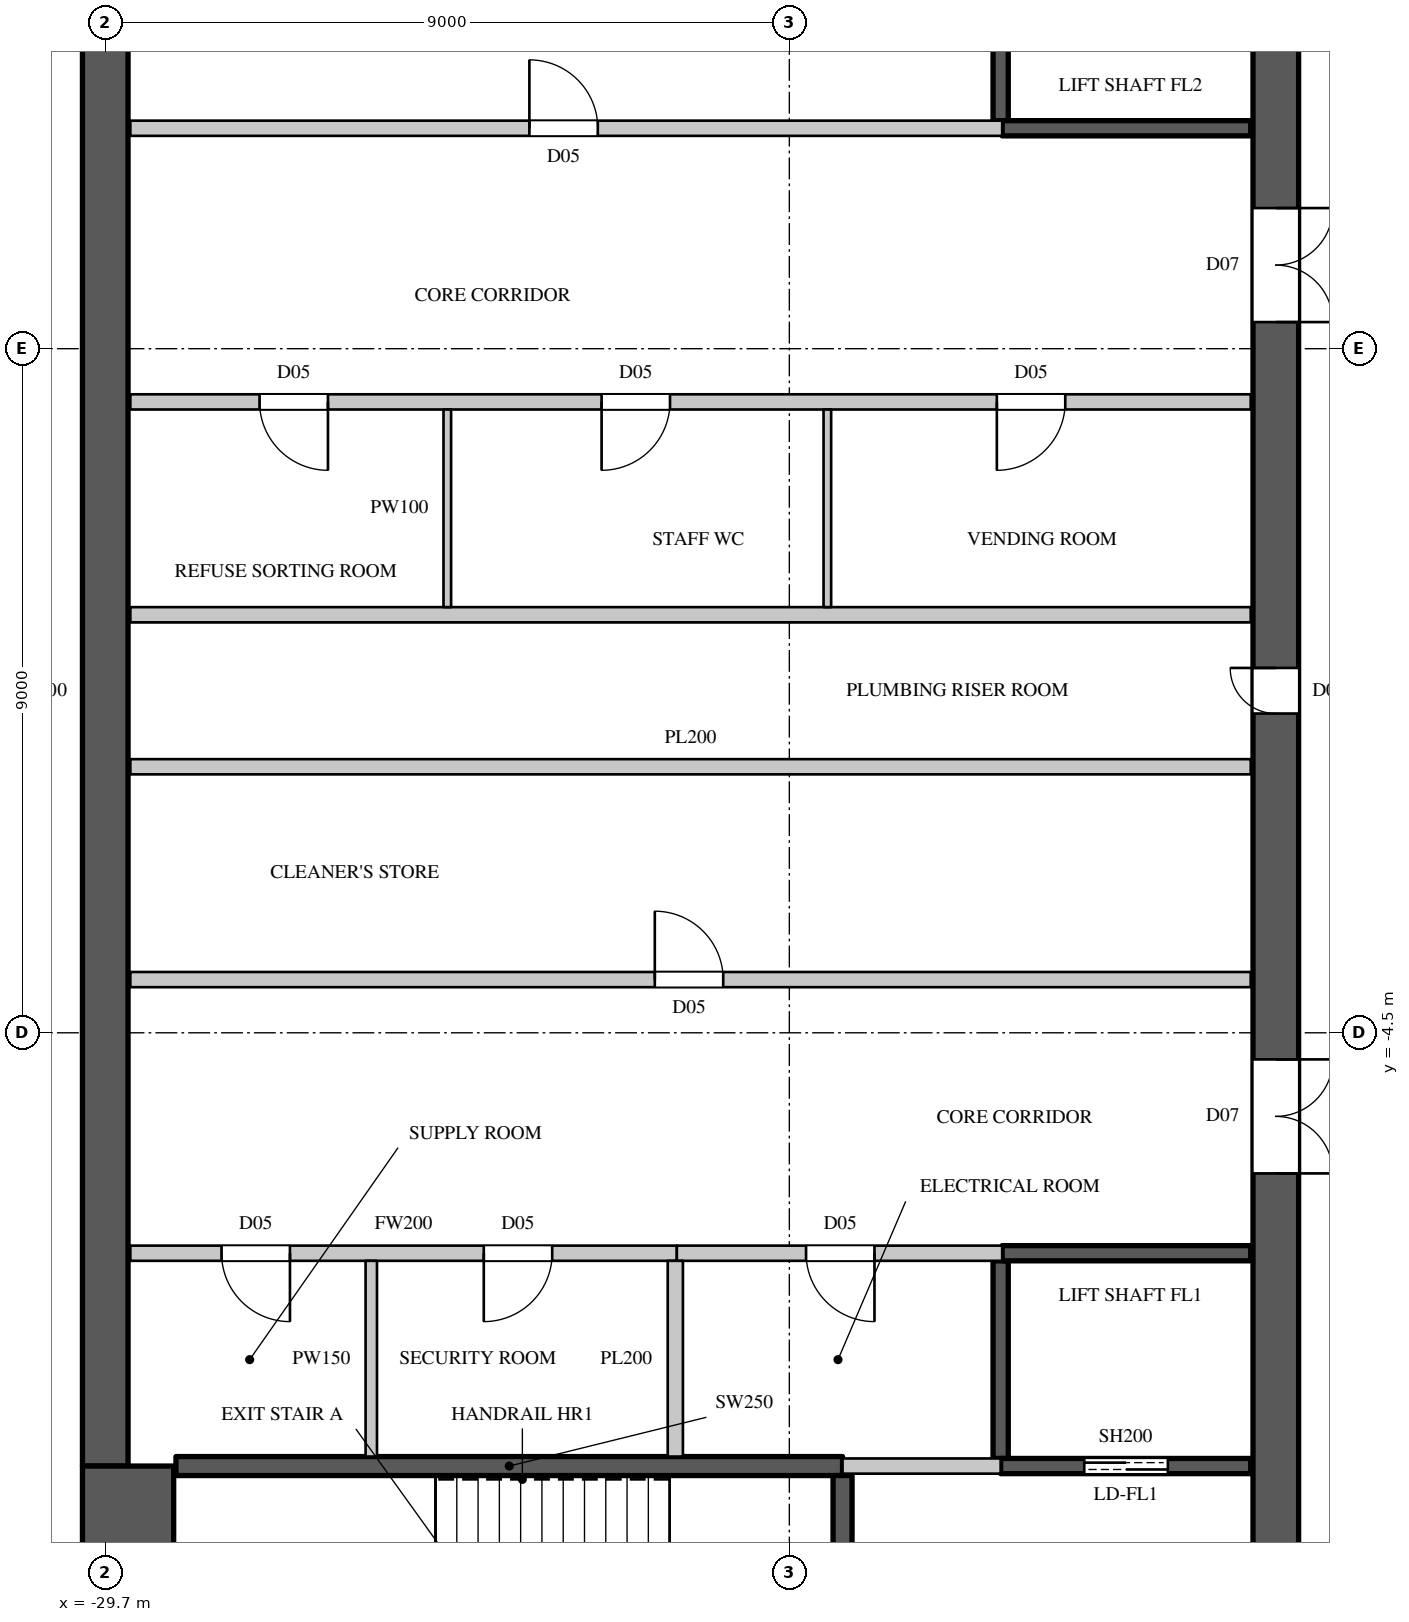
"""IFC4 building model, lengths in metres.
Left out: names, types, materials, properties, quantities, classifications, styles, units other than length and angle.
Written with IfcOpenShell. Run it as: python <this file> out.ifc"""

import sys

from ifc_helpers import new_model, si_unit, direction, frame, frame_2d, origin, place, context, subcontext, project, spatial, rectangle, extrude, element, fill, save


model = new_model("IFC4")
c1 = context("Model", 3, precision=1e-05, world=origin(), true_north=direction((0.0, 1.0)))
c2 = subcontext(c1, "Body", "Model", "MODEL_VIEW")
j1 = project(units=[si_unit("LENGTHUNIT", "METRE"), si_unit("PLANEANGLEUNIT", "RADIAN")], contexts=[c1])
p1 = place(None, origin())
s1 = spatial("IfcSite", under=j1, at=p1, CompositionType="ELEMENT")
p2 = place(p1, origin())
s2 = spatial("IfcBuilding", under=s1, at=p2, CompositionType="ELEMENT")
p3 = place(p2, frame((0.0, 0.0, 339.0)))
s3 = spatial("IfcBuildingStorey", under=s2, at=p3, CompositionType="ELEMENT", Elevation=339.0)
p4 = place(p3, frame((-14.3, -14.8, 0.0), z_axis=(0.0, 0.0, 1.0), x_axis=(0.0, 1.0, 0.0)))
e1 = element("IfcWall", 1, at=p4, inside=s3, PredefinedType="SHEAR", context=c2, shape_type="SweptSolid", body=[
    extrude(rectangle(XDim=29.6, YDim=0.6, at=frame_2d((14.8, 0.0))), origin(), (0.0, 0.0, 1.0), 4.0),
])
p5 = place(p4, frame((1.55, 0.0, 0.0)))
e2 = element("IfcOpeningElement", 2, at=p5, cuts=e1, PredefinedType="OPENING", context=c2, shape_type="SweptSolid", body=[
    extrude(rectangle(XDim=1.5, YDim=2.4, at=frame_2d((0.75, 1.2))), frame((0.0, 0.31, 0.0), z_axis=(0.0, -1.0, 0.0), x_axis=(1.0, 0.0, 0.0)), (0.0, 0.0, 1.0), 0.62),
])
p6 = place(p4, frame((26.55, 0.0, 0.0)))
e3 = element("IfcOpeningElement", 3, at=p6, cuts=e1, PredefinedType="OPENING", context=c2, shape_type="SweptSolid", body=[
    extrude(rectangle(XDim=1.5, YDim=2.4, at=frame_2d((0.75, 1.2))), frame((0.0, 0.31, 0.0), z_axis=(0.0, -1.0, 0.0), x_axis=(1.0, 0.0, 0.0)), (0.0, 0.0, 1.0), 0.62),
])
p7 = place(p4, frame((8.45, 0.0, 0.0)))
e4 = element("IfcOpeningElement", 4, at=p7, cuts=e1, PredefinedType="OPENING", context=c2, shape_type="SweptSolid", body=[
    extrude(rectangle(XDim=1.5, YDim=2.4, at=frame_2d((0.75, 1.2))), frame((0.0, 0.31, 0.0), z_axis=(0.0, -1.0, 0.0), x_axis=(1.0, 0.0, 0.0)), (0.0, 0.0, 1.0), 0.62),
])
p8 = place(p4, frame((19.65, 0.0, 0.0)))
e5 = element("IfcOpeningElement", 5, at=p8, cuts=e1, PredefinedType="OPENING", context=c2, shape_type="SweptSolid", body=[
    extrude(rectangle(XDim=1.5, YDim=2.4, at=frame_2d((0.75, 1.2))), frame((0.0, 0.31, 0.0), z_axis=(0.0, -1.0, 0.0), x_axis=(1.0, 0.0, 0.0)), (0.0, 0.0, 1.0), 0.62),
])
p9 = place(p4, frame((14.5, 0.0, 0.0)))
e6 = element("IfcOpeningElement", 6, at=p9, cuts=e1, PredefinedType="OPENING", context=c2, shape_type="SweptSolid", body=[
    extrude(rectangle(XDim=0.6, YDim=2.0, at=frame_2d((0.3, 1.0))), frame((0.0, 0.31, 0.0), z_axis=(0.0, -1.0, 0.0), x_axis=(1.0, 0.0, 0.0)), (0.0, 0.0, 1.0), 0.62),
])
p10 = place(p3, frame((-29.7, -10.2, 0.0), z_axis=(0.0, 0.0, 1.0), x_axis=(0.0, 1.0, 0.0)))
e7 = element("IfcWall", 7, at=p10, inside=s3, PredefinedType="SHEAR", context=c2, shape_type="SweptSolid", body=[
    extrude(rectangle(XDim=20.4, YDim=0.6, at=frame_2d((10.2, 0.0))), origin(), (0.0, 0.0, 1.0), 4.0),
])
p11 = place(p3, frame((-29.4, -14.8, 0.0), z_axis=(0.0, 0.0, 1.0), x_axis=(0.0, 1.0, 0.0)))
e8 = element("IfcWall", 8, at=p11, inside=s3, PredefinedType="SHEAR", context=c2, shape_type="SweptSolid", body=[
    extrude(rectangle(XDim=4.6, YDim=1.2, at=frame_2d((2.3, 0.0))), origin(), (0.0, 0.0, 1.0), 4.0),
])
p12 = place(p3, frame((-29.37, -7.4, 0.0), z_axis=(0.0, 0.0, 1.0), x_axis=(1.0, 0.0, 0.0)))
e9 = element("IfcWall", 9, at=p12, inside=s3, PredefinedType="PARTITIONING", context=c2, shape_type="SweptSolid", body=[
    extrude(rectangle(XDim=7.19, YDim=0.2, at=frame_2d((3.595, 0.0))), origin(), (0.0, 0.0, 1.0), 3.598),
])
p13 = place(p12, frame((1.2, 0.0, 0.0)))
e10 = element("IfcOpeningElement", 10, at=p13, cuts=e9, PredefinedType="OPENING", context=c2, shape_type="SweptSolid", body=[
    extrude(rectangle(XDim=0.9, YDim=2.2, at=frame_2d((0.45, 1.1))), frame((0.0, 0.11, 0.0), z_axis=(0.0, -1.0, 0.0), x_axis=(1.0, 0.0, 0.0)), (0.0, 0.0, 1.0), 0.22),
])
p14 = place(p12, frame((4.65, 0.0, 0.0)))
e11 = element("IfcOpeningElement", 11, at=p14, cuts=e9, PredefinedType="OPENING", context=c2, shape_type="SweptSolid", body=[
    extrude(rectangle(XDim=0.9, YDim=2.2, at=frame_2d((0.45, 1.1))), frame((0.0, 0.11, 0.0), z_axis=(0.0, -1.0, 0.0), x_axis=(1.0, 0.0, 0.0)), (0.0, 0.0, 1.0), 0.22),
])
p15 = place(p3, frame((-29.37, -3.8, 0.0), z_axis=(0.0, 0.0, 1.0), x_axis=(1.0, 0.0, 0.0)))
e12 = element("IfcWall", 12, at=p15, inside=s3, PredefinedType="PARTITIONING", context=c2, shape_type="SweptSolid", body=[
    extrude(rectangle(XDim=14.74, YDim=0.2, at=frame_2d((7.37, 0.0))), origin(), (0.0, 0.0, 1.0), 3.598),
])
p16 = place(p15, frame((6.9, 0.0, 0.0)))
e13 = element("IfcOpeningElement", 13, at=p16, cuts=e12, PredefinedType="OPENING", context=c2, shape_type="SweptSolid", body=[
    extrude(rectangle(XDim=0.9, YDim=2.2, at=frame_2d((0.45, 1.1))), frame((0.0, 0.11, 0.0), z_axis=(0.0, -1.0, 0.0), x_axis=(1.0, 0.0, 0.0)), (0.0, 0.0, 1.0), 0.22),
])
p17 = place(p3, frame((-29.37, 3.8, 0.0), z_axis=(0.0, 0.0, 1.0), x_axis=(1.0, 0.0, 0.0)))
e14 = element("IfcWall", 14, at=p17, inside=s3, PredefinedType="PARTITIONING", context=c2, shape_type="SweptSolid", body=[
    extrude(rectangle(XDim=14.74, YDim=0.2, at=frame_2d((7.37, 0.0))), origin(), (0.0, 0.0, 1.0), 3.598),
])
p18 = place(p17, frame((1.7, 0.0, 0.0)))
e15 = element("IfcOpeningElement", 15, at=p18, cuts=e14, PredefinedType="OPENING", context=c2, shape_type="SweptSolid", body=[
    extrude(rectangle(XDim=0.9, YDim=2.2, at=frame_2d((0.45, 1.1))), frame((0.0, 0.11, 0.0), z_axis=(0.0, -1.0, 0.0), x_axis=(1.0, 0.0, 0.0)), (0.0, 0.0, 1.0), 0.22),
])
p19 = place(p17, frame((6.2, 0.0, 0.0)))
e16 = element("IfcOpeningElement", 16, at=p19, cuts=e14, PredefinedType="OPENING", context=c2, shape_type="SweptSolid", body=[
    extrude(rectangle(XDim=0.9, YDim=2.2, at=frame_2d((0.45, 1.1))), frame((0.0, 0.11, 0.0), z_axis=(0.0, -1.0, 0.0), x_axis=(1.0, 0.0, 0.0)), (0.0, 0.0, 1.0), 0.22),
])
p20 = place(p17, frame((11.4, 0.0, 0.0)))
e17 = element("IfcOpeningElement", 17, at=p20, cuts=e14, PredefinedType="OPENING", context=c2, shape_type="SweptSolid", body=[
    extrude(rectangle(XDim=0.9, YDim=2.2, at=frame_2d((0.45, 1.1))), frame((0.0, 0.11, 0.0), z_axis=(0.0, -1.0, 0.0), x_axis=(1.0, 0.0, 0.0)), (0.0, 0.0, 1.0), 0.22),
])
p21 = place(p3, frame((-29.37, 7.4, 0.0), z_axis=(0.0, 0.0, 1.0), x_axis=(1.0, 0.0, 0.0)))
e18 = element("IfcWall", 18, at=p21, inside=s3, PredefinedType="PARTITIONING", context=c2, shape_type="SweptSolid", body=[
    extrude(rectangle(XDim=11.47, YDim=0.2, at=frame_2d((5.735, 0.0))), origin(), (0.0, 0.0, 1.0), 3.598),
])
p22 = place(p21, frame((5.25, 0.0, 0.0)))
e19 = element("IfcOpeningElement", 19, at=p22, cuts=e18, PredefinedType="OPENING", context=c2, shape_type="SweptSolid", body=[
    extrude(rectangle(XDim=0.9, YDim=2.2, at=frame_2d((0.45, 1.1))), frame((0.0, 0.11, 0.0), z_axis=(0.0, -1.0, 0.0), x_axis=(1.0, 0.0, 0.0)), (0.0, 0.0, 1.0), 0.22),
])
p23 = place(p3, frame((-26.2, -10.075, 0.0), z_axis=(0.0, 0.0, 1.0), x_axis=(0.0, 1.0, 0.0)))
e20 = element("IfcWall", 20, at=p23, inside=s3, PredefinedType="PARTITIONING", context=c2, shape_type="SweptSolid", body=[
    extrude(rectangle(XDim=2.575, YDim=0.15, at=frame_2d((1.288, 0.0))), origin(), (0.0, 0.0, 1.0), 3.598),
])
for number, where, z_axis, x_axis in (
    (21, (-29.37, -1.0, 0.0), (0.0, 0.0, 1.0), (1.0, 0.0, 0.0)),
    (22, (-29.37, 1.0, 0.0), (0.0, 0.0, 1.0), (1.0, 0.0, 0.0)),
):
    element("IfcWall", number, at=place(p3, frame(where, z_axis=z_axis, x_axis=x_axis)), inside=s3, PredefinedType="PARTITIONING", context=c2, shape_type="SweptSolid", body=[
        extrude(rectangle(XDim=14.74, YDim=0.2, at=frame_2d((7.37, 0.0))), origin(), (0.0, 0.0, 1.0), 3.598),
    ])
p24 = place(p3, frame((-22.18, -7.4, 0.0), z_axis=(0.0, 0.0, 1.0), x_axis=(1.0, 0.0, 0.0)))
e23 = element("IfcWall", 23, at=p24, inside=s3, PredefinedType="PARTITIONING", context=c2, shape_type="SweptSolid", body=[
    extrude(rectangle(XDim=4.28, YDim=0.2, at=frame_2d((2.14, 0.0))), origin(), (0.0, 0.0, 1.0), 3.598),
])
p25 = place(p24, frame((1.7, 0.0, 0.0)))
e24 = element("IfcOpeningElement", 24, at=p25, cuts=e23, PredefinedType="OPENING", context=c2, shape_type="SweptSolid", body=[
    extrude(rectangle(XDim=0.9, YDim=2.2, at=frame_2d((0.45, 1.1))), frame((0.0, 0.11, 0.0), z_axis=(0.0, -1.0, 0.0), x_axis=(1.0, 0.0, 0.0)), (0.0, 0.0, 1.0), 0.22),
])
p26 = place(p3, frame((-22.2, -10.075, 0.0), z_axis=(0.0, 0.0, 1.0), x_axis=(0.0, 1.0, 0.0)))
e25 = element("IfcWall", 25, at=p26, inside=s3, PredefinedType="PARTITIONING", context=c2, shape_type="SweptSolid", body=[
    extrude(rectangle(XDim=2.575, YDim=0.2, at=frame_2d((1.288, 0.0))), origin(), (0.0, 0.0, 1.0), 3.598),
])
p27 = place(p3, frame((-20.0, -10.2, 0.0), z_axis=(0.0, 0.0, 1.0), x_axis=(1.0, 0.0, 0.0)))
e26 = element("IfcWall", 26, at=p27, inside=s3, PredefinedType="PARTITIONING", context=c2, shape_type="SweptSolid", body=[
    extrude(rectangle(XDim=2.08, YDim=0.2, at=frame_2d((1.04, 0.0))), origin(), (0.0, 0.0, 1.0), 3.598),
])
p28 = place(p3, frame((-17.92, -10.1, 0.0), z_axis=(0.0, 0.0, 1.0), x_axis=(0.0, 1.0, 0.0)))
e27 = element("IfcWall", 27, at=p28, inside=s3, PredefinedType="SHEAR", context=c2, shape_type="SweptSolid", body=[
    extrude(rectangle(XDim=2.6, YDim=0.2, at=frame_2d((1.3, 0.0))), origin(), (0.0, 0.0, 1.0), 3.598),
])
p29 = place(p3, frame((-17.92, -10.2, 0.0), z_axis=(0.0, 0.0, 1.0), x_axis=(1.0, 0.0, 0.0)))
e28 = element("IfcWall", 28, at=p29, inside=s3, PredefinedType="SHEAR", context=c2, shape_type="SweptSolid", body=[
    extrude(rectangle(XDim=3.29, YDim=0.2, at=frame_2d((1.645, 0.0))), origin(), (0.0, 0.0, 1.0), 3.598),
])
p30 = place(p29, frame((1.1, 0.0, 0.0)))
e29 = element("IfcOpeningElement", 29, at=p30, cuts=e28, PredefinedType="OPENING", context=c2, shape_type="SweptSolid", body=[
    extrude(rectangle(XDim=1.1, YDim=2.2, at=frame_2d((0.55, 1.1))), frame((0.0, 0.11, 0.0), z_axis=(0.0, -1.0, 0.0), x_axis=(1.0, 0.0, 0.0)), (0.0, 0.0, 1.0), 0.22),
])
p31 = place(p3, frame((-17.9, -7.4, 0.0), z_axis=(0.0, 0.0, 1.0), x_axis=(1.0, 0.0, 0.0)))
e30 = element("IfcWall", 30, at=p31, inside=s3, PredefinedType="SHEAR", context=c2, shape_type="SweptSolid", body=[
    extrude(rectangle(XDim=3.27, YDim=0.2, at=frame_2d((1.635, 0.0))), origin(), (0.0, 0.0, 1.0), 3.598),
])
p32 = place(p3, frame((-17.92, 7.5, 0.0), z_axis=(0.0, 0.0, 1.0), x_axis=(0.0, 1.0, 0.0)))
e31 = element("IfcWall", 31, at=p32, inside=s3, PredefinedType="SHEAR", context=c2, shape_type="SweptSolid", body=[
    extrude(rectangle(XDim=2.6, YDim=0.2, at=frame_2d((1.3, 0.0))), origin(), (0.0, 0.0, 1.0), 3.598),
])
p33 = place(p3, frame((-17.9, 7.4, 0.0), z_axis=(0.0, 0.0, 1.0), x_axis=(1.0, 0.0, 0.0)))
e32 = element("IfcWall", 32, at=p33, inside=s3, PredefinedType="SHEAR", context=c2, shape_type="SweptSolid", body=[
    extrude(rectangle(XDim=3.27, YDim=0.2, at=frame_2d((1.635, 0.0))), origin(), (0.0, 0.0, 1.0), 3.598),
])
p34 = place(p3, frame((-28.77, -10.2, 0.0), z_axis=(0.0, 0.0, 1.0), x_axis=(1.0, 0.0, 0.0)))
e33 = element("IfcWall", 33, at=p34, inside=s3, PredefinedType="SHEAR", context=c2, shape_type="SweptSolid", body=[
    extrude(rectangle(XDim=8.77, YDim=0.25, at=frame_2d((4.385, 0.0))), origin(), (0.0, 0.0, 1.0), 3.598),
])
p35 = place(p3, frame((-20.0, -14.77, 0.0), z_axis=(0.0, 0.0, 1.0), x_axis=(0.0, 1.0, 0.0)))
e34 = element("IfcWall", 34, at=p35, inside=s3, PredefinedType="SHEAR", context=c2, shape_type="SweptSolid", body=[
    extrude(rectangle(XDim=4.445, YDim=0.25, at=frame_2d((2.223, 0.0))), origin(), (0.0, 0.0, 1.0), 3.598),
])
p36 = place(p35, frame((1.7, 0.0, 0.0)))
e35 = element("IfcOpeningElement", 35, at=p36, cuts=e34, PredefinedType="OPENING", context=c2, shape_type="SweptSolid", body=[
    extrude(rectangle(XDim=1.1, YDim=2.2, at=frame_2d((0.55, 1.1))), frame((0.0, 0.135, 0.0), z_axis=(0.0, -1.0, 0.0), x_axis=(1.0, 0.0, 0.0)), (0.0, 0.0, 1.0), 0.27),
])
for number, where, z_axis, x_axis in (
    (36, (-25.2, 1.1, 0.0), (0.0, 0.0, 1.0), (0.0, 1.0, 0.0)),
    (37, (-20.2, 1.1, 0.0), (0.0, 0.0, 1.0), (0.0, 1.0, 0.0)),
):
    element("IfcWall", number, at=place(p3, frame(where, z_axis=z_axis, x_axis=x_axis)), inside=s3, PredefinedType="PARTITIONING", context=c2, shape_type="SweptSolid", body=[
        extrude(rectangle(XDim=2.6, YDim=0.1, at=frame_2d((1.3, 0.0))), origin(), (0.0, 0.0, 1.0), 3.598),
    ])
p37 = place(p13, origin())
e38 = element("IfcDoor", 38, at=p37, inside=s3, OperationType="SINGLE_SWING_LEFT", PredefinedType="DOOR", context=c2, shape_type="SweptSolid", body=[
    extrude(rectangle(XDim=0.9, YDim=2.2, at=frame_2d((0.45, 1.1))), frame((0.0, 0.025, 0.0), z_axis=(0.0, -1.0, 0.0), x_axis=(1.0, 0.0, 0.0)), (0.0, 0.0, 1.0), 0.05),
])
fill(e10, e38)
p38 = place(p14, origin())
e39 = element("IfcDoor", 39, at=p38, inside=s3, OperationType="SINGLE_SWING_RIGHT", PredefinedType="DOOR", context=c2, shape_type="SweptSolid", body=[
    extrude(rectangle(XDim=0.9, YDim=2.2, at=frame_2d((0.45, 1.1))), frame((0.0, 0.025, 0.0), z_axis=(0.0, -1.0, 0.0), x_axis=(1.0, 0.0, 0.0)), (0.0, 0.0, 1.0), 0.05),
])
fill(e11, e39)
p39 = place(p25, origin())
e40 = element("IfcDoor", 40, at=p39, inside=s3, OperationType="SINGLE_SWING_LEFT", PredefinedType="DOOR", context=c2, shape_type="SweptSolid", body=[
    extrude(rectangle(XDim=0.9, YDim=2.2, at=frame_2d((0.45, 1.1))), frame((0.0, 0.025, 0.0), z_axis=(0.0, -1.0, 0.0), x_axis=(1.0, 0.0, 0.0)), (0.0, 0.0, 1.0), 0.05),
])
fill(e24, e40)
p40 = place(p16, origin())
e41 = element("IfcDoor", 41, at=p40, inside=s3, OperationType="SINGLE_SWING_LEFT", PredefinedType="DOOR", context=c2, shape_type="SweptSolid", body=[
    extrude(rectangle(XDim=0.9, YDim=2.2, at=frame_2d((0.45, 1.1))), frame((0.0, 0.025, 0.0), z_axis=(0.0, -1.0, 0.0), x_axis=(1.0, 0.0, 0.0)), (0.0, 0.0, 1.0), 0.05),
])
fill(e13, e41)
p41 = place(p18, origin())
e42 = element("IfcDoor", 42, at=p41, inside=s3, OperationType="SINGLE_SWING_LEFT", PredefinedType="DOOR", context=c2, shape_type="SweptSolid", body=[
    extrude(rectangle(XDim=0.9, YDim=2.2, at=frame_2d((0.45, 1.1))), frame((0.0, 0.025, 0.0), z_axis=(0.0, -1.0, 0.0), x_axis=(1.0, 0.0, 0.0)), (0.0, 0.0, 1.0), 0.05),
])
fill(e15, e42)
p42 = place(p19, origin())
e43 = element("IfcDoor", 43, at=p42, inside=s3, OperationType="SINGLE_SWING_RIGHT", PredefinedType="DOOR", context=c2, shape_type="SweptSolid", body=[
    extrude(rectangle(XDim=0.9, YDim=2.2, at=frame_2d((0.45, 1.1))), frame((0.0, 0.025, 0.0), z_axis=(0.0, -1.0, 0.0), x_axis=(1.0, 0.0, 0.0)), (0.0, 0.0, 1.0), 0.05),
])
fill(e16, e43)
p43 = place(p20, origin())
e44 = element("IfcDoor", 44, at=p43, inside=s3, OperationType="SINGLE_SWING_RIGHT", PredefinedType="DOOR", context=c2, shape_type="SweptSolid", body=[
    extrude(rectangle(XDim=0.9, YDim=2.2, at=frame_2d((0.45, 1.1))), frame((0.0, 0.025, 0.0), z_axis=(0.0, -1.0, 0.0), x_axis=(1.0, 0.0, 0.0)), (0.0, 0.0, 1.0), 0.05),
])
fill(e17, e44)
p44 = place(p22, origin())
e45 = element("IfcDoor", 45, at=p44, inside=s3, OperationType="SINGLE_SWING_LEFT", PredefinedType="DOOR", context=c2, shape_type="SweptSolid", body=[
    extrude(rectangle(XDim=0.9, YDim=2.2, at=frame_2d((0.45, 1.1))), frame((0.0, 0.025, 0.0), z_axis=(0.0, -1.0, 0.0), x_axis=(1.0, 0.0, 0.0)), (0.0, 0.0, 1.0), 0.05),
])
fill(e19, e45)
p45 = place(p30, origin())
e46 = element("IfcDoor", 46, at=p45, inside=s3, OperationType="DOUBLE_DOOR_SLIDING", PredefinedType="DOOR", context=c2, shape_type="SweptSolid", body=[
    extrude(rectangle(XDim=1.1, YDim=2.2, at=frame_2d((0.55, 1.1))), frame((0.0, 0.025, 0.0), z_axis=(0.0, -1.0, 0.0), x_axis=(1.0, 0.0, 0.0)), (0.0, 0.0, 1.0), 0.05),
])
fill(e29, e46)
p46 = place(p7, origin())
e47 = element("IfcDoor", 47, at=p46, inside=s3, OperationType="DOUBLE_DOOR_SINGLE_SWING", PredefinedType="DOOR", context=c2, shape_type="SweptSolid", body=[
    extrude(rectangle(XDim=1.5, YDim=2.4, at=frame_2d((0.75, 1.2))), frame((0.0, -0.245, 0.0), z_axis=(0.0, -1.0, 0.0), x_axis=(1.0, 0.0, 0.0)), (0.0, 0.0, 1.0), 0.05),
])
fill(e4, e47)
p47 = place(p8, origin())
e48 = element("IfcDoor", 48, at=p47, inside=s3, OperationType="DOUBLE_DOOR_SINGLE_SWING", PredefinedType="DOOR", context=c2, shape_type="SweptSolid", body=[
    extrude(rectangle(XDim=1.5, YDim=2.4, at=frame_2d((0.75, 1.2))), frame((0.0, -0.245, 0.0), z_axis=(0.0, -1.0, 0.0), x_axis=(1.0, 0.0, 0.0)), (0.0, 0.0, 1.0), 0.05),
])
fill(e5, e48)
p48 = place(p9, origin())
e49 = element("IfcDoor", 49, at=p48, inside=s3, OperationType="SINGLE_SWING_RIGHT", PredefinedType="DOOR", context=c2, shape_type="SweptSolid", body=[
    extrude(rectangle(XDim=0.6, YDim=2.0, at=frame_2d((0.3, 1.0))), frame((0.0, 0.295, 0.0), z_axis=(0.0, -1.0, 0.0), x_axis=(1.0, 0.0, 0.0)), (0.0, 0.0, 1.0), 0.05),
])
fill(e6, e49)
save(model, sys.argv[1])
